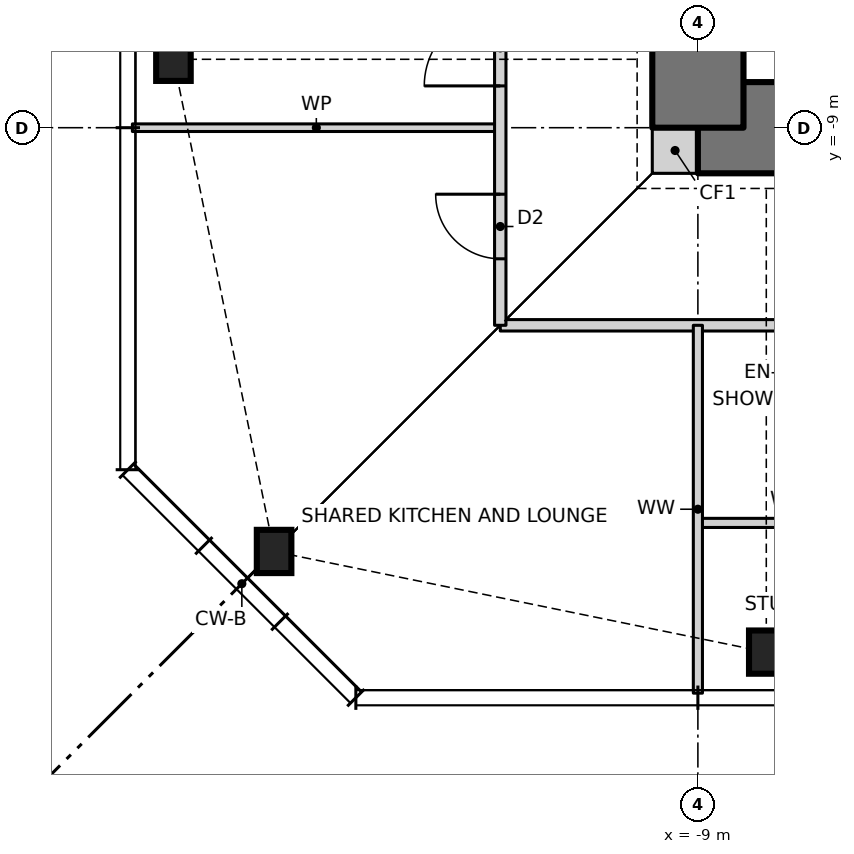
"""IFC4 building model, lengths in metres.
Left out: names, types, materials, properties, quantities, classifications, styles, units other than length and angle.
Written with IfcOpenShell. Run it as: python <this file> out.ifc"""

import sys

from ifc_helpers import new_model, si_unit, direction, frame, frame_2d, origin, origin_2d, place, context, subcontext, project, spatial, rectangle, i_section, extrude, element, fill, save


model = new_model("IFC4")
c1 = context("Model", 3, precision=1e-05, world=origin(), true_north=direction((0.0, 1.0)))
c2 = subcontext(c1, "Body", "Model", "MODEL_VIEW")
j1 = project(units=[si_unit("LENGTHUNIT", "METRE"), si_unit("PLANEANGLEUNIT", "RADIAN")], contexts=[c1])
p1 = place(None, origin())
s1 = spatial("IfcSite", under=j1, at=p1, CompositionType="ELEMENT")
p2 = place(p1, origin())
s2 = spatial("IfcBuilding", under=s1, at=p2, CompositionType="ELEMENT")
p3 = place(p2, frame((0.0, 0.0, 218.5)))
s3 = spatial("IfcBuildingStorey", under=s2, at=p3, CompositionType="ELEMENT", Elevation=218.5)
for number, where, z_axis, x_axis in (
    (1, (-14.576, -14.576, 0.0), (0.0, 0.0, 1.0), (1.0, 0.0, 0.0)),
    (2, (-8.1, -15.9, 0.0), (0.0, 0.0, 1.0), (1.0, 0.0, 0.0)),
    (3, (-15.9, -8.1, 0.0), (0.0, 0.0, 1.0), (1.0, 0.0, 0.0)),
):
    element("IfcColumn", number, at=place(p3, frame(where, z_axis=z_axis, x_axis=x_axis)), inside=s3, PredefinedType="COLUMN", context=c2, shape_type="SweptSolid", body=[
        extrude(i_section(OverallWidth=0.455, OverallDepth=0.569, WebThickness=0.078, FlangeThickness=0.125, at=origin_2d()), origin(), (0.0, 0.0, 1.0), 3.5),
    ])
p4 = place(p3, frame((-9.6, -9.3, 0.0), z_axis=(0.0, 0.0, 1.0), x_axis=(1.0, 0.0, 0.0)))
e4 = element("IfcWall", 4, at=p4, inside=s3, PredefinedType="SOLIDWALL", context=c2, shape_type="SweptSolid", body=[
    extrude(rectangle(XDim=0.6, YDim=0.6, at=frame_2d((0.3, 0.0))), origin(), (0.0, 0.0, 1.0), 3.5),
])
p5 = place(p3, frame((-9.0, -9.0, 0.0), z_axis=(0.0, 0.0, 1.0), x_axis=(1.0, 0.0, 0.0)))
e5 = element("IfcWall", 5, at=p5, inside=s3, PredefinedType="SHEAR", context=c2, shape_type="SweptSolid", body=[
    extrude(rectangle(XDim=18.0, YDim=1.2, at=frame_2d((9.0, 0.0))), origin(), (0.0, 0.0, 1.0), 3.5),
])
p6 = place(p5, frame((3.775, 0.0, 0.0)))
e6 = element("IfcOpeningElement", 6, at=p6, cuts=e5, PredefinedType="OPENING", context=c2, shape_type="SweptSolid", body=[
    extrude(rectangle(XDim=0.9, YDim=2.1, at=frame_2d((0.45, 1.05))), frame((0.0, 0.61, 0.0), z_axis=(0.0, -1.0, 0.0), x_axis=(1.0, 0.0, 0.0)), (0.0, 0.0, 1.0), 1.22),
])
p7 = place(p5, frame((10.625, 0.0, 0.0)))
e7 = element("IfcOpeningElement", 7, at=p7, cuts=e5, PredefinedType="OPENING", context=c2, shape_type="SweptSolid", body=[
    extrude(rectangle(XDim=0.9, YDim=2.1, at=frame_2d((0.45, 1.05))), frame((0.0, 0.61, 0.0), z_axis=(0.0, -1.0, 0.0), x_axis=(1.0, 0.0, 0.0)), (0.0, 0.0, 1.0), 1.22),
])
p8 = place(p3, frame((-9.0, 9.0, 0.0), z_axis=(0.0, 0.0, 1.0), x_axis=(0.0, -1.0, 0.0)))
e8 = element("IfcWall", 8, at=p8, inside=s3, PredefinedType="SHEAR", context=c2, shape_type="SweptSolid", body=[
    extrude(rectangle(XDim=18.0, YDim=1.2, at=frame_2d((9.0, 0.0))), origin(), (0.0, 0.0, 1.0), 3.5),
])
p9 = place(p8, frame((8.5, 0.0, 0.0)))
e9 = element("IfcOpeningElement", 9, at=p9, cuts=e8, PredefinedType="OPENING", context=c2, shape_type="SweptSolid", body=[
    extrude(rectangle(XDim=1.0, YDim=2.1, at=frame_2d((0.5, 1.05))), frame((0.0, 0.61, 0.0), z_axis=(0.0, -1.0, 0.0), x_axis=(1.0, 0.0, 0.0)), (0.0, 0.0, 1.0), 1.22),
])
p10 = place(p3, frame((-9.0, -14.2, 0.0), z_axis=(0.0, 0.0, 1.0), x_axis=(1.0, 0.0, 0.0)))
e10 = element("IfcWall", 10, at=p10, inside=s3, PredefinedType="PARTITIONING", context=c2, shape_type="SweptSolid", body=[
    extrude(rectangle(XDim=2.4, YDim=0.12, at=frame_2d((1.2, 0.0))), origin(), (0.0, 0.0, 1.0), 3.27),
])
p11 = place(p3, frame((-11.6, -11.6, 0.0), z_axis=(0.0, 0.0, 1.0), x_axis=(1.0, 0.0, 0.0)))
e11 = element("IfcWall", 11, at=p11, inside=s3, PredefinedType="PARTITIONING", context=c2, shape_type="SweptSolid", body=[
    extrude(rectangle(XDim=23.2, YDim=0.15, at=frame_2d((11.6, 0.0))), origin(), (0.0, 0.0, 1.0), 3.27),
])
p12 = place(p11, frame((5.55, 0.0, 0.0)))
e12 = element("IfcOpeningElement", 12, at=p12, cuts=e11, PredefinedType="OPENING", context=c2, shape_type="SweptSolid", body=[
    extrude(rectangle(XDim=1.0, YDim=2.1, at=frame_2d((0.5, 1.05))), frame((0.0, 0.085, 0.0), z_axis=(0.0, -1.0, 0.0), x_axis=(1.0, 0.0, 0.0)), (0.0, 0.0, 1.0), 0.17),
])
p13 = place(p11, frame((7.65, 0.0, 0.0)))
e13 = element("IfcOpeningElement", 13, at=p13, cuts=e11, PredefinedType="OPENING", context=c2, shape_type="SweptSolid", body=[
    extrude(rectangle(XDim=1.0, YDim=2.1, at=frame_2d((0.5, 1.05))), frame((0.0, 0.085, 0.0), z_axis=(0.0, -1.0, 0.0), x_axis=(1.0, 0.0, 0.0)), (0.0, 0.0, 1.0), 0.17),
])
p14 = place(p11, frame((14.55, 0.0, 0.0)))
e14 = element("IfcOpeningElement", 14, at=p14, cuts=e11, PredefinedType="OPENING", context=c2, shape_type="SweptSolid", body=[
    extrude(rectangle(XDim=1.0, YDim=2.1, at=frame_2d((0.5, 1.05))), frame((0.0, 0.085, 0.0), z_axis=(0.0, -1.0, 0.0), x_axis=(1.0, 0.0, 0.0)), (0.0, 0.0, 1.0), 0.17),
])
p15 = place(p11, frame((16.65, 0.0, 0.0)))
e15 = element("IfcOpeningElement", 15, at=p15, cuts=e11, PredefinedType="OPENING", context=c2, shape_type="SweptSolid", body=[
    extrude(rectangle(XDim=1.0, YDim=2.1, at=frame_2d((0.5, 1.05))), frame((0.0, 0.085, 0.0), z_axis=(0.0, -1.0, 0.0), x_axis=(1.0, 0.0, 0.0)), (0.0, 0.0, 1.0), 0.17),
])
p16 = place(p11, frame((21.0, 0.0, 0.0)))
e16 = element("IfcOpeningElement", 16, at=p16, cuts=e11, PredefinedType="OPENING", context=c2, shape_type="SweptSolid", body=[
    extrude(rectangle(XDim=1.8, YDim=2.1, at=frame_2d((0.9, 1.05))), frame((0.0, 0.085, 0.0), z_axis=(0.0, -1.0, 0.0), x_axis=(1.0, 0.0, 0.0)), (0.0, 0.0, 1.0), 0.17),
])
p17 = place(p3, frame((-16.44, -9.0, 0.0), z_axis=(0.0, 0.0, 1.0), x_axis=(1.0, 0.0, 0.0)))
e17 = element("IfcWall", 17, at=p17, inside=s3, PredefinedType="PARTITIONING", context=c2, shape_type="SweptSolid", body=[
    extrude(rectangle(XDim=4.84, YDim=0.1, at=frame_2d((2.42, 0.0))), origin(), (0.0, 0.0, 1.0), 3.27),
])
p18 = place(p3, frame((-9.0, -16.44, 0.0), z_axis=(0.0, 0.0, 1.0), x_axis=(0.0, 1.0, 0.0)))
e18 = element("IfcWall", 18, at=p18, inside=s3, PredefinedType="PARTITIONING", context=c2, shape_type="SweptSolid", body=[
    extrude(rectangle(XDim=4.84, YDim=0.12, at=frame_2d((2.42, 0.0))), origin(), (0.0, 0.0, 1.0), 3.27),
])
p19 = place(p3, frame((-11.6, -11.6, 0.0), z_axis=(0.0, 0.0, 1.0), x_axis=(0.0, 1.0, 0.0)))
e19 = element("IfcWall", 19, at=p19, inside=s3, PredefinedType="PARTITIONING", context=c2, shape_type="SweptSolid", body=[
    extrude(rectangle(XDim=23.2, YDim=0.15, at=frame_2d((11.6, 0.0))), origin(), (0.0, 0.0, 1.0), 3.27),
])
p20 = place(p19, frame((16.5, 0.0, 0.0)))
e20 = element("IfcOpeningElement", 20, at=p20, cuts=e19, PredefinedType="OPENING", context=c2, shape_type="SweptSolid", body=[
    extrude(rectangle(XDim=1.0, YDim=2.1, at=frame_2d((0.5, 1.05))), frame((0.0, 0.085, 0.0), z_axis=(0.0, -1.0, 0.0), x_axis=(1.0, 0.0, 0.0)), (0.0, 0.0, 1.0), 0.17),
])
p21 = place(p19, frame((10.05, 0.0, 0.0)))
e21 = element("IfcOpeningElement", 21, at=p21, cuts=e19, PredefinedType="OPENING", context=c2, shape_type="SweptSolid", body=[
    extrude(rectangle(XDim=1.0, YDim=2.1, at=frame_2d((0.5, 1.05))), frame((0.0, 0.085, 0.0), z_axis=(0.0, -1.0, 0.0), x_axis=(1.0, 0.0, 0.0)), (0.0, 0.0, 1.0), 0.17),
])
p22 = place(p19, frame((3.15, 0.0, 0.0)))
e22 = element("IfcOpeningElement", 22, at=p22, cuts=e19, PredefinedType="OPENING", context=c2, shape_type="SweptSolid", body=[
    extrude(rectangle(XDim=1.0, YDim=2.1, at=frame_2d((0.5, 1.05))), frame((0.0, 0.085, 0.0), z_axis=(0.0, -1.0, 0.0), x_axis=(1.0, 0.0, 0.0)), (0.0, 0.0, 1.0), 0.17),
])
p23 = place(p19, frame((0.875, 0.0, 0.0)))
e23 = element("IfcOpeningElement", 23, at=p23, cuts=e19, PredefinedType="OPENING", context=c2, shape_type="SweptSolid", body=[
    extrude(rectangle(XDim=0.85, YDim=2.1, at=frame_2d((0.425, 1.05))), frame((0.0, 0.085, 0.0), z_axis=(0.0, -1.0, 0.0), x_axis=(1.0, 0.0, 0.0)), (0.0, 0.0, 1.0), 0.17),
])
p24 = place(p22, origin())
e24 = element("IfcDoor", 24, at=p24, inside=s3, OperationType="SINGLE_SWING_LEFT", PredefinedType="DOOR", context=c2, shape_type="SweptSolid", body=[
    extrude(rectangle(XDim=1.0, YDim=2.1, at=frame_2d((0.5, 1.05))), frame((0.0, 0.025, 0.0), z_axis=(0.0, -1.0, 0.0), x_axis=(1.0, 0.0, 0.0)), (0.0, 0.0, 1.0), 0.05),
])
fill(e22, e24)
p25 = place(p23, origin())
e25 = element("IfcDoor", 25, at=p25, inside=s3, OperationType="SINGLE_SWING_RIGHT", PredefinedType="DOOR", context=c2, shape_type="SweptSolid", body=[
    extrude(rectangle(XDim=0.85, YDim=2.1, at=frame_2d((0.425, 1.05))), frame((0.0, 0.025, 0.0), z_axis=(0.0, -1.0, 0.0), x_axis=(1.0, 0.0, 0.0)), (0.0, 0.0, 1.0), 0.05),
])
fill(e23, e25)
save(model, sys.argv[1])
